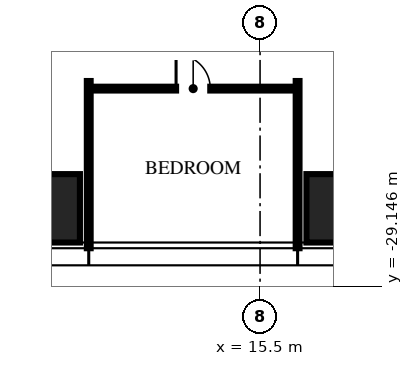
"""IFC4 building model, lengths in metres.
Left out: names, types, materials, properties, quantities, classifications, styles, units other than length and angle.
Written with IfcOpenShell. Run it as: python <this file> out.ifc"""

import sys

from ifc_helpers import new_model, si_unit, direction, frame, frame_2d, origin, origin_2d, place, context, subcontext, project, spatial, rectangle, hollow_rectangle, extrude, element, fill, save


model = new_model("IFC4")
c1 = context("Model", 3, precision=1e-05, world=origin(), true_north=direction((0.0, 1.0)))
c2 = subcontext(c1, "Body", "Model", "MODEL_VIEW")
j1 = project(units=[si_unit("LENGTHUNIT", "METRE"), si_unit("PLANEANGLEUNIT", "RADIAN")], contexts=[c1])
p1 = place(None, origin())
s1 = spatial("IfcSite", under=j1, at=p1, CompositionType="ELEMENT")
p2 = place(p1, origin())
s2 = spatial("IfcBuilding", under=s1, at=p2, CompositionType="ELEMENT")
p3 = place(p2, frame((0.0, 0.0, 174.75)))
s3 = spatial("IfcBuildingStorey", under=s2, at=p3, CompositionType="ELEMENT", Elevation=174.75)
for number, where, z_axis, x_axis in (
    (1, (18.32, -27.1, 0.0), (0.0, 0.0, 1.0), (1.0, 0.0, 0.0)),
    (2, (9.16, -27.1, 0.0), (0.0, 0.0, 1.0), (1.0, 0.0, 0.0)),
):
    element("IfcColumn", number, at=place(p3, frame(where, z_axis=z_axis, x_axis=x_axis)), inside=s3, PredefinedType="COLUMN", context=c2, shape_type="SweptSolid", body=[
        extrude(hollow_rectangle(XDim=3.2, YDim=1.8, WallThickness=0.2, at=origin_2d()), origin(), (0.0, 0.0, 1.0), 3.75),
    ])
for number, where, z_axis, x_axis in (
    (3, (10.992, -23.75, 0.0), (0.0, 0.0, 1.0), (0.0, -1.0, 0.0)),
    (4, (16.488, -23.75, 0.0), (0.0, 0.0, 1.0), (0.0, -1.0, 0.0)),
):
    element("IfcWall", number, at=place(p3, frame(where, z_axis=z_axis, x_axis=x_axis)), inside=s3, PredefinedType="PARTITIONING", context=c2, shape_type="SweptSolid", body=[
        extrude(rectangle(XDim=4.4, YDim=0.1, at=frame_2d((2.2, 0.0))), origin(), (0.0, 0.0, 1.0), 2.81),
    ])
p4 = place(p3, frame((10.992, -23.95, 0.0), z_axis=(0.0, 0.0, 1.0), x_axis=(1.0, 0.0, 0.0)))
e5 = element("IfcWall", 5, at=p4, inside=s3, PredefinedType="PARTITIONING", context=c2, shape_type="SweptSolid", body=[
    extrude(rectangle(XDim=5.496, YDim=0.1, at=frame_2d((2.748, 0.0))), origin(), (0.0, 0.0, 1.0), 2.81),
])
p5 = place(p4, frame((2.298, 0.0, 0.0)))
e6 = element("IfcOpeningElement", 6, at=p5, cuts=e5, PredefinedType="OPENING", context=c2, shape_type="SweptSolid", body=[
    extrude(rectangle(XDim=0.9, YDim=2.1, at=frame_2d((0.45, 1.05))), frame((0.0, 0.06, 0.0), z_axis=(0.0, -1.0, 0.0), x_axis=(1.0, 0.0, 0.0)), (0.0, 0.0, 1.0), 0.12),
])
p6 = place(p5, origin())
e7 = element("IfcDoor", 7, at=p6, inside=s3, OperationType="SINGLE_SWING_LEFT", PredefinedType="DOOR", context=c2, shape_type="SweptSolid", body=[
    extrude(rectangle(XDim=0.9, YDim=2.1, at=frame_2d((0.45, 1.05))), frame((0.0, 0.025, 0.0), z_axis=(0.0, -1.0, 0.0), x_axis=(1.0, 0.0, 0.0)), (0.0, 0.0, 1.0), 0.05),
])
fill(e6, e7)
save(model, sys.argv[1])
